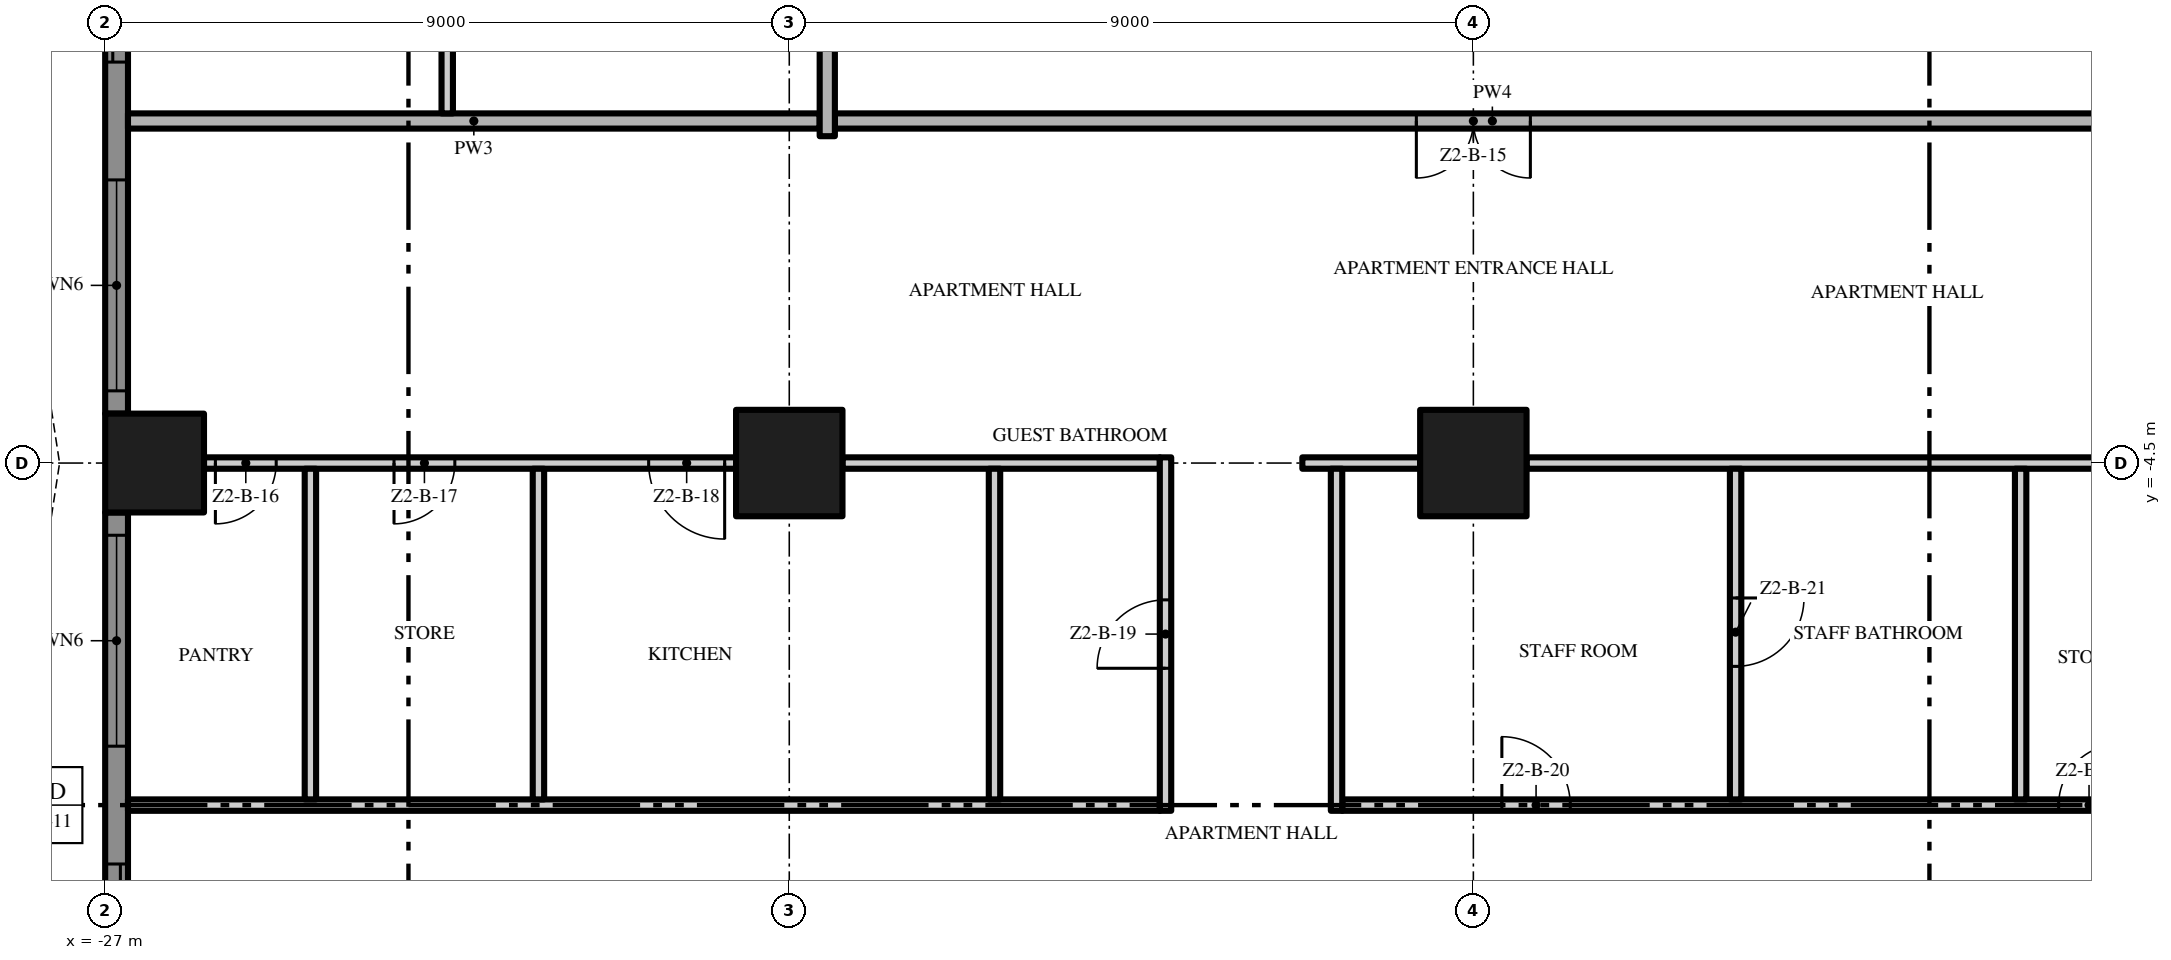
"""IFC4 building model, lengths in metres.
Left out: names, types, materials, properties, quantities, classifications, styles, units other than length and angle.
Written with IfcOpenShell. Run it as: python <this file> out.ifc"""

import sys

from ifc_helpers import new_model, si_unit, direction, frame, frame_2d, origin, origin_2d, place, context, subcontext, project, spatial, polyline, rectangle, outline, extrude, element, fill, save


model = new_model("IFC4")
c1 = context("Model", 3, precision=1e-05, world=origin(), true_north=direction((0.0, 1.0)))
c2 = subcontext(c1, "Body", "Model", "MODEL_VIEW")
j1 = project(units=[si_unit("LENGTHUNIT", "METRE"), si_unit("PLANEANGLEUNIT", "RADIAN")], contexts=[c1])
p1 = place(None, origin())
s1 = spatial("IfcSite", under=j1, at=p1, CompositionType="ELEMENT")
p2 = place(p1, origin())
s2 = spatial("IfcBuilding", under=s1, at=p2, CompositionType="ELEMENT")
p3 = place(p2, frame((0.0, 0.0, 84.6)))
s3 = spatial("IfcBuildingStorey", under=s2, at=p3, CompositionType="ELEMENT", Elevation=84.6)
p4 = place(p3, frame((-18.0, -4.5, 0.0), z_axis=(0.0, 0.0, 1.0), x_axis=(1.0, 0.0, 0.0)))
e1 = element("IfcColumn", 1, at=p4, inside=s3, PredefinedType="COLUMN", context=c2, shape_type="SweptSolid", body=[
    extrude(rectangle(XDim=1.4, YDim=1.4, at=origin_2d()), origin(), (0.0, 0.0, 1.0), 3.5),
])
p5 = place(p3, frame((-26.35, -4.5, 0.0), z_axis=(0.0, 0.0, 1.0), x_axis=(1.0, 0.0, 0.0)))
e2 = element("IfcColumn", 2, at=p5, inside=s3, PredefinedType="COLUMN", context=c2, shape_type="SweptSolid", body=[
    extrude(rectangle(XDim=1.3, YDim=1.3, at=origin_2d()), origin(), (0.0, 0.0, 1.0), 3.5),
])
p6 = place(p3, frame((-9.0, -4.5, 0.0), z_axis=(0.0, 0.0, 1.0), x_axis=(1.0, 0.0, 0.0)))
e3 = element("IfcColumn", 3, at=p6, inside=s3, PredefinedType="COLUMN", context=c2, shape_type="SweptSolid", body=[
    extrude(rectangle(XDim=1.4, YDim=1.4, at=origin_2d()), origin(), (0.0, 0.0, 1.0), 3.5),
])
p7 = place(p3, frame((-26.85, -3.85, 0.0), z_axis=(0.0, 0.0, 1.0), x_axis=(0.0, 1.0, 0.0)))
e4 = element("IfcWall", 4, at=p7, inside=s3, PredefinedType="SOLIDWALL", context=c2, shape_type="SweptSolid", body=[
    extrude(rectangle(XDim=7.7, YDim=0.3, at=frame_2d((3.85, 0.0))), origin(), (0.0, 0.0, 1.0), 3.5),
])
p8 = place(p7, frame((4.625, 0.0, 0.0)))
e5 = element("IfcOpeningElement", 5, at=p8, cuts=e4, PredefinedType="OPENING", context=c2, shape_type="SweptSolid", body=[
    extrude(rectangle(XDim=2.775, YDim=2.4, at=frame_2d((1.387, 1.2))), frame((0.0, 0.16, 0.0), z_axis=(0.0, -1.0, 0.0), x_axis=(1.0, 0.0, 0.0)), (0.0, 0.0, 1.0), 0.32),
])
p9 = place(p7, frame((0.3, 0.0, 0.45)))
e6 = element("IfcOpeningElement", 6, at=p9, cuts=e4, PredefinedType="OPENING", context=c2, shape_type="SweptSolid", body=[
    extrude(rectangle(XDim=2.775, YDim=2.65, at=frame_2d((1.387, 1.325))), frame((0.0, 0.16, 0.0), z_axis=(0.0, -1.0, 0.0), x_axis=(1.0, 0.0, 0.0)), (0.0, 0.0, 1.0), 0.32),
])
p10 = place(p3, frame((-26.85, -12.85, 0.0), z_axis=(0.0, 0.0, 1.0), x_axis=(0.0, 1.0, 0.0)))
e7 = element("IfcWall", 7, at=p10, inside=s3, PredefinedType="SOLIDWALL", context=c2, shape_type="SweptSolid", body=[
    extrude(rectangle(XDim=7.7, YDim=0.3, at=frame_2d((3.85, 0.0))), origin(), (0.0, 0.0, 1.0), 3.5),
])
p11 = place(p10, frame((4.625, 0.0, 0.45)))
e8 = element("IfcOpeningElement", 8, at=p11, cuts=e7, PredefinedType="OPENING", context=c2, shape_type="SweptSolid", body=[
    extrude(rectangle(XDim=2.775, YDim=2.65, at=frame_2d((1.387, 1.325))), frame((0.0, 0.16, 0.0), z_axis=(0.0, -1.0, 0.0), x_axis=(1.0, 0.0, 0.0)), (0.0, 0.0, 1.0), 0.32),
])
p12 = place(p10, frame((0.3, 0.0, 0.0)))
e9 = element("IfcOpeningElement", 9, at=p12, cuts=e7, PredefinedType="OPENING", context=c2, shape_type="SweptSolid", body=[
    extrude(rectangle(XDim=2.775, YDim=2.4, at=frame_2d((1.387, 1.2))), frame((0.0, 0.16, 0.0), z_axis=(0.0, -1.0, 0.0), x_axis=(1.0, 0.0, 0.0)), (0.0, 0.0, 1.0), 0.32),
])
p13 = place(p3, origin())
e10 = element("IfcWall", 10, at=p13, inside=s3, PredefinedType="USERDEFINED", context=c2, shape_type="SweptSolid", body=[
    extrude(outline(polyline([(-30.0, 18.0), (-29.771, 16.5), (-29.171, 15.0), (-28.429, 13.5), (-27.829, 12.0), (-27.6, 10.5), (-27.829, 9.0), (-28.429, 7.5), (-29.171, 6.0), (-29.771, 4.5), (-30.0, 3.0), (-29.771, 1.5), (-29.171, 0.0), (-28.429, -1.5), (-27.829, -3.0), (-27.6, -4.5), (-27.829, -6.0), (-28.429, -7.5), (-29.171, -9.0), (-29.771, -10.5), (-30.0, -12.0), (-29.771, -13.5), (-29.171, -15.0), (-28.429, -16.5), (-27.829, -18.0), (-27.597, -17.907), (-28.201, -16.398), (-28.942, -14.898), (-29.528, -13.434), (-29.747, -12.0), (-29.528, -10.566), (-28.942, -9.102), (-28.201, -7.602), (-27.586, -6.066), (-27.347, -4.5), (-27.586, -2.934), (-28.201, -1.398), (-28.942, 0.102), (-29.528, 1.566), (-29.747, 3.0), (-29.528, 4.434), (-28.942, 5.898), (-28.201, 7.398), (-27.586, 8.934), (-27.347, 10.5), (-27.586, 12.066), (-28.201, 13.602), (-28.942, 15.102), (-29.528, 16.566), (-29.753, 18.038), (-30.0, 18.0)])), origin(), (0.0, 0.0, 1.0), 0.9),
])
p14 = place(p3, frame((-26.7, -9.0, 0.0), z_axis=(0.0, 0.0, 1.0), x_axis=(1.0, 0.0, 0.0)))
e11 = element("IfcWall", 11, at=p14, inside=s3, PredefinedType="PARTITIONING", context=c2, shape_type="SweptSolid", body=[
    extrude(rectangle(XDim=13.575, YDim=0.15, at=frame_2d((6.787, 0.0))), origin(), (0.0, 0.0, 1.0), 3.5),
])
p15 = place(p3, frame((-10.725, -9.0, 0.0), z_axis=(0.0, 0.0, 1.0), x_axis=(1.0, 0.0, 0.0)))
e12 = element("IfcWall", 12, at=p15, inside=s3, PredefinedType="PARTITIONING", context=c2, shape_type="SweptSolid", body=[
    extrude(rectangle(XDim=10.625, YDim=0.15, at=frame_2d((5.312, 0.0))), origin(), (0.0, 0.0, 1.0), 3.5),
])
p16 = place(p15, frame((2.1, 0.0, 0.0)))
e13 = element("IfcOpeningElement", 13, at=p16, cuts=e12, PredefinedType="OPENING", context=c2, shape_type="SweptSolid", body=[
    extrude(rectangle(XDim=0.9, YDim=2.1, at=frame_2d((0.45, 1.05))), frame((0.0, 0.085, 0.0), z_axis=(0.0, -1.0, 0.0), x_axis=(1.0, 0.0, 0.0)), (0.0, 0.0, 1.0), 0.17),
])
p17 = place(p15, frame((9.425, 0.0, 0.0)))
e14 = element("IfcOpeningElement", 14, at=p17, cuts=e12, PredefinedType="OPENING", context=c2, shape_type="SweptSolid", body=[
    extrude(rectangle(XDim=0.8, YDim=2.0, at=frame_2d((0.4, 1.0))), frame((0.0, 0.085, 0.0), z_axis=(0.0, -1.0, 0.0), x_axis=(1.0, 0.0, 0.0)), (0.0, 0.0, 1.0), 0.17),
])
p18 = place(p3, frame((-18.7, -4.5, 0.0), z_axis=(0.0, 0.0, 1.0), x_axis=(-1.0, 0.0, 0.0)))
e15 = element("IfcWall", 15, at=p18, inside=s3, PredefinedType="PARTITIONING", context=c2, shape_type="SweptSolid", body=[
    extrude(rectangle(XDim=7.0, YDim=0.15, at=frame_2d((3.5, 0.0))), origin(), (0.0, 0.0, 1.0), 3.5),
])
p19 = place(p18, frame((6.05, 0.0, 0.0)))
e16 = element("IfcOpeningElement", 16, at=p19, cuts=e15, PredefinedType="OPENING", context=c2, shape_type="SweptSolid", body=[
    extrude(rectangle(XDim=0.8, YDim=2.0, at=frame_2d((0.4, 1.0))), frame((0.0, 0.085, 0.0), z_axis=(0.0, -1.0, 0.0), x_axis=(1.0, 0.0, 0.0)), (0.0, 0.0, 1.0), 0.17),
])
p20 = place(p18, frame((3.7, 0.0, 0.0)))
e17 = element("IfcOpeningElement", 17, at=p20, cuts=e15, PredefinedType="OPENING", context=c2, shape_type="SweptSolid", body=[
    extrude(rectangle(XDim=0.8, YDim=2.0, at=frame_2d((0.4, 1.0))), frame((0.0, 0.085, 0.0), z_axis=(0.0, -1.0, 0.0), x_axis=(1.0, 0.0, 0.0)), (0.0, 0.0, 1.0), 0.17),
])
p21 = place(p18, frame((0.15, 0.0, 0.0)))
e18 = element("IfcOpeningElement", 18, at=p21, cuts=e15, PredefinedType="OPENING", context=c2, shape_type="SweptSolid", body=[
    extrude(rectangle(XDim=1.0, YDim=2.4, at=frame_2d((0.5, 1.2))), frame((0.0, 0.085, 0.0), z_axis=(0.0, -1.0, 0.0), x_axis=(1.0, 0.0, 0.0)), (0.0, 0.0, 1.0), 0.17),
])
p22 = place(p3, frame((-17.3, -4.5, 0.0), z_axis=(0.0, 0.0, 1.0), x_axis=(1.0, 0.0, 0.0)))
e19 = element("IfcWall", 19, at=p22, inside=s3, PredefinedType="PARTITIONING", context=c2, shape_type="SweptSolid", body=[
    extrude(rectangle(XDim=4.175, YDim=0.15, at=frame_2d((2.087, 0.0))), origin(), (0.0, 0.0, 1.0), 3.5),
])
p23 = place(p3, frame((-11.25, -4.5, 0.0), z_axis=(0.0, 0.0, 1.0), x_axis=(1.0, 0.0, 0.0)))
e20 = element("IfcWall", 20, at=p23, inside=s3, PredefinedType="PARTITIONING", context=c2, shape_type="SweptSolid", body=[
    extrude(rectangle(XDim=1.55, YDim=0.15, at=frame_2d((0.775, 0.0))), origin(), (0.0, 0.0, 1.0), 3.5),
])
p24 = place(p3, frame((-8.3, -4.5, 0.0), z_axis=(0.0, 0.0, 1.0), x_axis=(1.0, 0.0, 0.0)))
e21 = element("IfcWall", 21, at=p24, inside=s3, PredefinedType="PARTITIONING", context=c2, shape_type="SweptSolid", body=[
    extrude(rectangle(XDim=7.6, YDim=0.15, at=frame_2d((3.8, 0.0))), origin(), (0.0, 0.0, 1.0), 3.5),
])
p25 = place(p3, frame((-0.1, 0.0, 0.0), z_axis=(0.0, 0.0, 1.0), x_axis=(-1.0, 0.0, 0.0)))
e22 = element("IfcWall", 22, at=p25, inside=s3, PredefinedType="PARTITIONING", context=c2, shape_type="SweptSolid", body=[
    extrude(rectangle(XDim=17.3, YDim=0.2, at=frame_2d((8.65, 0.0))), origin(), (0.0, 0.0, 1.0), 3.5),
])
p26 = place(p25, frame((8.15, 0.0, 0.0)))
e23 = element("IfcOpeningElement", 23, at=p26, cuts=e22, PredefinedType="OPENING", context=c2, shape_type="SweptSolid", body=[
    extrude(rectangle(XDim=1.5, YDim=2.4, at=frame_2d((0.75, 1.2))), frame((0.0, 0.11, 0.0), z_axis=(0.0, -1.0, 0.0), x_axis=(1.0, 0.0, 0.0)), (0.0, 0.0, 1.0), 0.22),
])
p27 = place(p3, frame((-26.7, 0.0, 0.0), z_axis=(0.0, 0.0, 1.0), x_axis=(1.0, 0.0, 0.0)))
e24 = element("IfcWall", 24, at=p27, inside=s3, PredefinedType="PARTITIONING", context=c2, shape_type="SweptSolid", body=[
    extrude(rectangle(XDim=9.1, YDim=0.2, at=frame_2d((4.55, 0.0))), origin(), (0.0, 0.0, 1.0), 3.5),
])
p28 = place(p3, frame((-24.3, -8.925, 0.0), z_axis=(0.0, 0.0, 1.0), x_axis=(0.0, 1.0, 0.0)))
e25 = element("IfcWall", 25, at=p28, inside=s3, PredefinedType="PARTITIONING", context=c2, shape_type="SweptSolid", body=[
    extrude(rectangle(XDim=4.35, YDim=0.15, at=frame_2d((2.175, 0.0))), origin(), (0.0, 0.0, 1.0), 3.5),
])
p29 = place(p3, frame((-22.5, 0.1, 0.0), z_axis=(0.0, 0.0, 1.0), x_axis=(0.0, 1.0, 0.0)))
e26 = element("IfcWall", 26, at=p29, inside=s3, PredefinedType="PARTITIONING", context=c2, shape_type="SweptSolid", body=[
    extrude(rectangle(XDim=17.25, YDim=0.15, at=frame_2d((8.625, 0.0))), origin(), (0.0, 0.0, 1.0), 3.5),
])
p30 = place(p29, frame((1.65, 0.0, 0.0)))
e27 = element("IfcOpeningElement", 27, at=p30, cuts=e26, PredefinedType="OPENING", context=c2, shape_type="SweptSolid", body=[
    extrude(rectangle(XDim=1.0, YDim=2.4, at=frame_2d((0.5, 1.2))), frame((0.0, 0.085, 0.0), z_axis=(0.0, -1.0, 0.0), x_axis=(1.0, 0.0, 0.0)), (0.0, 0.0, 1.0), 0.17),
])
p31 = place(p29, frame((5.0, 0.0, 0.0)))
e28 = element("IfcOpeningElement", 28, at=p31, cuts=e26, PredefinedType="OPENING", context=c2, shape_type="SweptSolid", body=[
    extrude(rectangle(XDim=1.0, YDim=2.4, at=frame_2d((0.5, 1.2))), frame((0.0, 0.085, 0.0), z_axis=(0.0, -1.0, 0.0), x_axis=(1.0, 0.0, 0.0)), (0.0, 0.0, 1.0), 0.17),
])
p32 = place(p29, frame((11.75, 0.0, 0.0)))
e29 = element("IfcOpeningElement", 29, at=p32, cuts=e26, PredefinedType="OPENING", context=c2, shape_type="SweptSolid", body=[
    extrude(rectangle(XDim=1.0, YDim=2.4, at=frame_2d((0.5, 1.2))), frame((0.0, 0.085, 0.0), z_axis=(0.0, -1.0, 0.0), x_axis=(1.0, 0.0, 0.0)), (0.0, 0.0, 1.0), 0.17),
])
p33 = place(p29, frame((16.1, 0.0, 0.0)))
e30 = element("IfcOpeningElement", 30, at=p33, cuts=e26, PredefinedType="OPENING", context=c2, shape_type="SweptSolid", body=[
    extrude(rectangle(XDim=1.0, YDim=2.4, at=frame_2d((0.5, 1.2))), frame((0.0, 0.085, 0.0), z_axis=(0.0, -1.0, 0.0), x_axis=(1.0, 0.0, 0.0)), (0.0, 0.0, 1.0), 0.17),
])
p34 = place(p3, frame((-21.3, -8.925, 0.0), z_axis=(0.0, 0.0, 1.0), x_axis=(0.0, 1.0, 0.0)))
e31 = element("IfcWall", 31, at=p34, inside=s3, PredefinedType="PARTITIONING", context=c2, shape_type="SweptSolid", body=[
    extrude(rectangle(XDim=4.35, YDim=0.15, at=frame_2d((2.175, 0.0))), origin(), (0.0, 0.0, 1.0), 3.5),
])
p35 = place(p3, frame((-17.5, -0.2, 0.0), z_axis=(0.0, 0.0, 1.0), x_axis=(0.0, 1.0, 0.0)))
e32 = element("IfcWall", 32, at=p35, inside=s3, PredefinedType="PARTITIONING", context=c2, shape_type="SweptSolid", body=[
    extrude(rectangle(XDim=4.0, YDim=0.2, at=frame_2d((2.0, 0.0))), origin(), (0.0, 0.0, 1.0), 3.5),
])
p36 = place(p3, frame((-15.3, -8.925, 0.0), z_axis=(0.0, 0.0, 1.0), x_axis=(0.0, 1.0, 0.0)))
e33 = element("IfcWall", 33, at=p36, inside=s3, PredefinedType="PARTITIONING", context=c2, shape_type="SweptSolid", body=[
    extrude(rectangle(XDim=4.35, YDim=0.15, at=frame_2d((2.175, 0.0))), origin(), (0.0, 0.0, 1.0), 3.5),
])
p37 = place(p3, frame((-13.05, -9.075, 0.0), z_axis=(0.0, 0.0, 1.0), x_axis=(0.0, 1.0, 0.0)))
e34 = element("IfcWall", 34, at=p37, inside=s3, PredefinedType="PARTITIONING", context=c2, shape_type="SweptSolid", body=[
    extrude(rectangle(XDim=4.65, YDim=0.15, at=frame_2d((2.325, 0.0))), origin(), (0.0, 0.0, 1.0), 3.5),
])
p38 = place(p37, frame((1.875, 0.0, 0.0)))
e35 = element("IfcOpeningElement", 35, at=p38, cuts=e34, PredefinedType="OPENING", context=c2, shape_type="SweptSolid", body=[
    extrude(rectangle(XDim=0.9, YDim=2.1, at=frame_2d((0.45, 1.05))), frame((0.0, 0.085, 0.0), z_axis=(0.0, -1.0, 0.0), x_axis=(1.0, 0.0, 0.0)), (0.0, 0.0, 1.0), 0.17),
])
p39 = place(p3, frame((-10.8, -9.075, 0.0), z_axis=(0.0, 0.0, 1.0), x_axis=(0.0, 1.0, 0.0)))
e36 = element("IfcWall", 36, at=p39, inside=s3, PredefinedType="PARTITIONING", context=c2, shape_type="SweptSolid", body=[
    extrude(rectangle(XDim=4.5, YDim=0.15, at=frame_2d((2.25, 0.0))), origin(), (0.0, 0.0, 1.0), 3.5),
])
p40 = place(p3, frame((-5.55, -4.575, 0.0), z_axis=(0.0, 0.0, 1.0), x_axis=(0.0, -1.0, 0.0)))
e37 = element("IfcWall", 37, at=p40, inside=s3, PredefinedType="PARTITIONING", context=c2, shape_type="SweptSolid", body=[
    extrude(rectangle(XDim=4.35, YDim=0.15, at=frame_2d((2.175, 0.0))), origin(), (0.0, 0.0, 1.0), 3.5),
])
p41 = place(p40, frame((1.7, 0.0, 0.0)))
e38 = element("IfcOpeningElement", 38, at=p41, cuts=e37, PredefinedType="OPENING", context=c2, shape_type="SweptSolid", body=[
    extrude(rectangle(XDim=0.9, YDim=2.1, at=frame_2d((0.45, 1.05))), frame((0.0, 0.085, 0.0), z_axis=(0.0, -1.0, 0.0), x_axis=(1.0, 0.0, 0.0)), (0.0, 0.0, 1.0), 0.17),
])
p42 = place(p3, frame((-1.8, -8.925, 0.0), z_axis=(0.0, 0.0, 1.0), x_axis=(0.0, 1.0, 0.0)))
e39 = element("IfcWall", 39, at=p42, inside=s3, PredefinedType="PARTITIONING", context=c2, shape_type="SweptSolid", body=[
    extrude(rectangle(XDim=4.35, YDim=0.15, at=frame_2d((2.175, 0.0))), origin(), (0.0, 0.0, 1.0), 3.5),
])
p43 = place(p8, origin())
e40 = element("IfcDoor", 40, at=p43, inside=s3, OperationType="SINGLE_SWING_LEFT", PredefinedType="DOOR", context=c2, shape_type="SweptSolid", body=[
    extrude(rectangle(XDim=2.775, YDim=2.4, at=frame_2d((1.387, 1.2))), frame((0.0, 0.025, 0.0), z_axis=(0.0, -1.0, 0.0), x_axis=(1.0, 0.0, 0.0)), (0.0, 0.0, 1.0), 0.05),
])
fill(e5, e40)
p44 = place(p9, origin())
e41 = element("IfcWindow", 41, at=p44, inside=s3, PartitioningType="SINGLE_PANEL", PredefinedType="WINDOW", context=c2, shape_type="SweptSolid", body=[
    extrude(rectangle(XDim=2.775, YDim=2.65, at=frame_2d((1.387, 1.325))), frame((0.0, 0.03, 0.0), z_axis=(0.0, -1.0, 0.0), x_axis=(1.0, 0.0, 0.0)), (0.0, 0.0, 1.0), 0.06),
])
fill(e6, e41)
p45 = place(p11, origin())
e42 = element("IfcWindow", 42, at=p45, inside=s3, PartitioningType="SINGLE_PANEL", PredefinedType="WINDOW", context=c2, shape_type="SweptSolid", body=[
    extrude(rectangle(XDim=2.775, YDim=2.65, at=frame_2d((1.387, 1.325))), frame((0.0, 0.03, 0.0), z_axis=(0.0, -1.0, 0.0), x_axis=(1.0, 0.0, 0.0)), (0.0, 0.0, 1.0), 0.06),
])
fill(e8, e42)
p46 = place(p12, origin())
e43 = element("IfcDoor", 43, at=p46, inside=s3, OperationType="SINGLE_SWING_LEFT", PredefinedType="DOOR", context=c2, shape_type="SweptSolid", body=[
    extrude(rectangle(XDim=2.775, YDim=2.4, at=frame_2d((1.387, 1.2))), frame((0.0, 0.025, 0.0), z_axis=(0.0, -1.0, 0.0), x_axis=(1.0, 0.0, 0.0)), (0.0, 0.0, 1.0), 0.05),
])
fill(e9, e43)
p47 = place(p26, origin())
e44 = element("IfcDoor", 44, at=p47, inside=s3, OperationType="DOUBLE_DOOR_SINGLE_SWING", PredefinedType="DOOR", context=c2, shape_type="SweptSolid", body=[
    extrude(rectangle(XDim=1.5, YDim=2.4, at=frame_2d((0.75, 1.2))), frame((0.0, 0.025, 0.0), z_axis=(0.0, -1.0, 0.0), x_axis=(1.0, 0.0, 0.0)), (0.0, 0.0, 1.0), 0.05),
])
fill(e23, e44)
p48 = place(p19, origin())
e45 = element("IfcDoor", 45, at=p48, inside=s3, OperationType="SINGLE_SWING_RIGHT", PredefinedType="DOOR", context=c2, shape_type="SweptSolid", body=[
    extrude(rectangle(XDim=0.8, YDim=2.0, at=frame_2d((0.4, 1.0))), frame((0.0, 0.025, 0.0), z_axis=(0.0, -1.0, 0.0), x_axis=(1.0, 0.0, 0.0)), (0.0, 0.0, 1.0), 0.05),
])
fill(e16, e45)
p49 = place(p20, origin())
e46 = element("IfcDoor", 46, at=p49, inside=s3, OperationType="SINGLE_SWING_RIGHT", PredefinedType="DOOR", context=c2, shape_type="SweptSolid", body=[
    extrude(rectangle(XDim=0.8, YDim=2.0, at=frame_2d((0.4, 1.0))), frame((0.0, 0.025, 0.0), z_axis=(0.0, -1.0, 0.0), x_axis=(1.0, 0.0, 0.0)), (0.0, 0.0, 1.0), 0.05),
])
fill(e17, e46)
p50 = place(p21, origin())
e47 = element("IfcDoor", 47, at=p50, inside=s3, OperationType="SINGLE_SWING_LEFT", PredefinedType="DOOR", context=c2, shape_type="SweptSolid", body=[
    extrude(rectangle(XDim=1.0, YDim=2.4, at=frame_2d((0.5, 1.2))), frame((0.0, 0.025, 0.0), z_axis=(0.0, -1.0, 0.0), x_axis=(1.0, 0.0, 0.0)), (0.0, 0.0, 1.0), 0.05),
])
fill(e18, e47)
p51 = place(p38, origin())
e48 = element("IfcDoor", 48, at=p51, inside=s3, OperationType="SINGLE_SWING_LEFT", PredefinedType="DOOR", context=c2, shape_type="SweptSolid", body=[
    extrude(rectangle(XDim=0.9, YDim=2.1, at=frame_2d((0.45, 1.05))), frame((0.0, 0.025, 0.0), z_axis=(0.0, -1.0, 0.0), x_axis=(1.0, 0.0, 0.0)), (0.0, 0.0, 1.0), 0.05),
])
fill(e35, e48)
p52 = place(p16, origin())
e49 = element("IfcDoor", 49, at=p52, inside=s3, OperationType="SINGLE_SWING_LEFT", PredefinedType="DOOR", context=c2, shape_type="SweptSolid", body=[
    extrude(rectangle(XDim=0.9, YDim=2.1, at=frame_2d((0.45, 1.05))), frame((0.0, 0.025, 0.0), z_axis=(0.0, -1.0, 0.0), x_axis=(1.0, 0.0, 0.0)), (0.0, 0.0, 1.0), 0.05),
])
fill(e13, e49)
p53 = place(p41, origin())
e50 = element("IfcDoor", 50, at=p53, inside=s3, OperationType="SINGLE_SWING_LEFT", PredefinedType="DOOR", context=c2, shape_type="SweptSolid", body=[
    extrude(rectangle(XDim=0.9, YDim=2.1, at=frame_2d((0.45, 1.05))), frame((0.0, 0.025, 0.0), z_axis=(0.0, -1.0, 0.0), x_axis=(1.0, 0.0, 0.0)), (0.0, 0.0, 1.0), 0.05),
])
fill(e38, e50)
p54 = place(p17, origin())
e51 = element("IfcDoor", 51, at=p54, inside=s3, OperationType="SINGLE_SWING_RIGHT", PredefinedType="DOOR", context=c2, shape_type="SweptSolid", body=[
    extrude(rectangle(XDim=0.8, YDim=2.0, at=frame_2d((0.4, 1.0))), frame((0.0, 0.025, 0.0), z_axis=(0.0, -1.0, 0.0), x_axis=(1.0, 0.0, 0.0)), (0.0, 0.0, 1.0), 0.05),
])
fill(e14, e51)
save(model, sys.argv[1])
